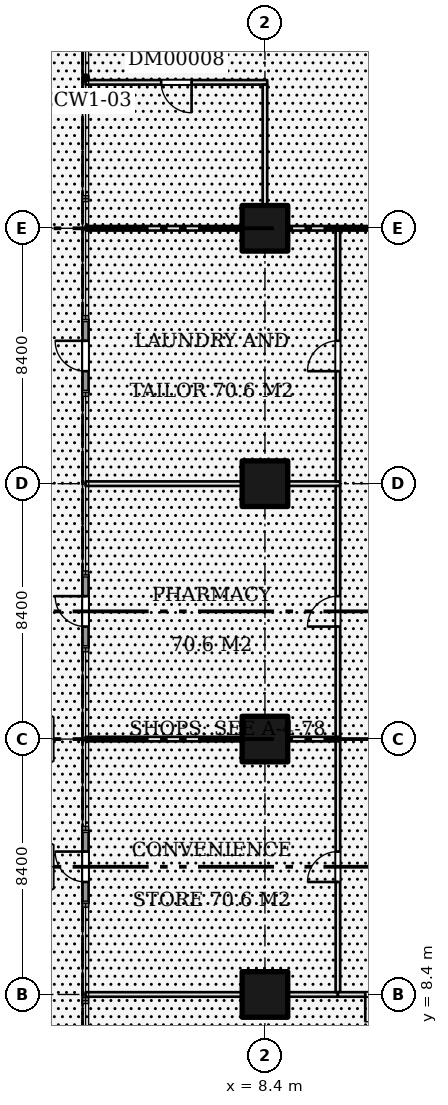
"""IFC4 building model, lengths in metres.
Left out: names, types, materials, properties, quantities, classifications, styles, units other than length and angle.
Written with IfcOpenShell. Run it as: python <this file> out.ifc"""

import sys

from ifc_helpers import new_model, si_unit, direction, frame, frame_2d, origin, origin_2d, place, context, subcontext, project, spatial, rectangle, extrude, element, fill, save


model = new_model("IFC4")
c1 = context("Model", 3, precision=1e-05, world=origin(), true_north=direction((0.0, 1.0)))
c2 = subcontext(c1, "Body", "Model", "MODEL_VIEW")
j1 = project(units=[si_unit("LENGTHUNIT", "METRE"), si_unit("PLANEANGLEUNIT", "RADIAN")], contexts=[c1])
p1 = place(None, origin())
s1 = spatial("IfcSite", under=j1, at=p1, CompositionType="ELEMENT")
p2 = place(p1, origin())
s2 = spatial("IfcBuilding", under=s1, at=p2, CompositionType="ELEMENT")
p3 = place(p2, origin())
s3 = spatial("IfcBuildingStorey", under=s2, at=p3, CompositionType="ELEMENT", Elevation=0.0)
for number, where, z_axis, x_axis in (
    (1, (8.4, 8.4, 0.0), (0.0, 0.0, 1.0), (1.0, 0.0, 0.0)),
    (2, (8.4, 16.8, 0.0), (0.0, 0.0, 1.0), (1.0, 0.0, 0.0)),
    (3, (8.4, 25.2, 0.0), (0.0, 0.0, 1.0), (1.0, 0.0, 0.0)),
    (4, (8.4, 33.6, 0.0), (0.0, 0.0, 1.0), (1.0, 0.0, 0.0)),
):
    element("IfcColumn", number, at=place(p3, frame(where, z_axis=z_axis, x_axis=x_axis)), inside=s3, PredefinedType="COLUMN", context=c2, shape_type="SweptSolid", body=[
        extrude(rectangle(XDim=1.5, YDim=1.5, at=origin_2d()), origin(), (0.0, 0.0, 1.0), 8.7),
    ])
p4 = place(p3, frame((2.5, 8.4, 0.0), z_axis=(0.0, 0.0, 1.0), x_axis=(1.0, 0.0, 0.0)))
e5 = element("IfcWall", 5, at=p4, inside=s3, PredefinedType="PARTITIONING", context=c2, shape_type="SweptSolid", body=[
    extrude(rectangle(XDim=5.15, YDim=0.15, at=frame_2d((2.575, 0.0))), origin(), (0.0, 0.0, 1.0), 8.7),
])
p5 = place(p3, frame((9.15, 8.4, 0.0), z_axis=(0.0, 0.0, 1.0), x_axis=(1.0, 0.0, 0.0)))
e6 = element("IfcWall", 6, at=p5, inside=s3, PredefinedType="PARTITIONING", context=c2, shape_type="SweptSolid", body=[
    extrude(rectangle(XDim=1.65, YDim=0.15, at=frame_2d((0.825, 0.0))), origin(), (0.0, 0.0, 1.0), 8.7),
])
p6 = place(p3, frame((2.5, 16.8, 0.0), z_axis=(0.0, 0.0, 1.0), x_axis=(1.0, 0.0, 0.0)))
e7 = element("IfcWall", 7, at=p6, inside=s3, PredefinedType="PARTITIONING", context=c2, shape_type="SweptSolid", body=[
    extrude(rectangle(XDim=5.15, YDim=0.15, at=frame_2d((2.575, 0.0))), origin(), (0.0, 0.0, 1.0), 8.7),
])
p7 = place(p3, frame((9.15, 16.8, 0.0), z_axis=(0.0, 0.0, 1.0), x_axis=(1.0, 0.0, 0.0)))
e8 = element("IfcWall", 8, at=p7, inside=s3, PredefinedType="PARTITIONING", context=c2, shape_type="SweptSolid", body=[
    extrude(rectangle(XDim=1.725, YDim=0.15, at=frame_2d((0.863, 0.0))), origin(), (0.0, 0.0, 1.0), 8.7),
])
p8 = place(p3, frame((2.5, 25.2, 0.0), z_axis=(0.0, 0.0, 1.0), x_axis=(1.0, 0.0, 0.0)))
e9 = element("IfcWall", 9, at=p8, inside=s3, PredefinedType="PARTITIONING", context=c2, shape_type="SweptSolid", body=[
    extrude(rectangle(XDim=5.15, YDim=0.15, at=frame_2d((2.575, 0.0))), origin(), (0.0, 0.0, 1.0), 8.7),
])
p9 = place(p3, frame((9.15, 25.2, 0.0), z_axis=(0.0, 0.0, 1.0), x_axis=(1.0, 0.0, 0.0)))
e10 = element("IfcWall", 10, at=p9, inside=s3, PredefinedType="PARTITIONING", context=c2, shape_type="SweptSolid", body=[
    extrude(rectangle(XDim=1.725, YDim=0.15, at=frame_2d((0.863, 0.0))), origin(), (0.0, 0.0, 1.0), 8.7),
])
p10 = place(p3, frame((2.5, 33.6, 0.0), z_axis=(0.0, 0.0, 1.0), x_axis=(1.0, 0.0, 0.0)))
e11 = element("IfcWall", 11, at=p10, inside=s3, PredefinedType="PARTITIONING", context=c2, shape_type="SweptSolid", body=[
    extrude(rectangle(XDim=5.15, YDim=0.15, at=frame_2d((2.575, 0.0))), origin(), (0.0, 0.0, 1.0), 8.7),
])
p11 = place(p3, frame((2.5, 38.4, 0.0), z_axis=(0.0, 0.0, 1.0), x_axis=(1.0, 0.0, 0.0)))
e12 = element("IfcWall", 12, at=p11, inside=s3, PredefinedType="PARTITIONING", context=c2, shape_type="SweptSolid", body=[
    extrude(rectangle(XDim=5.975, YDim=0.15, at=frame_2d((2.988, 0.0))), origin(), (0.0, 0.0, 1.0), 8.7),
])
p12 = place(p11, frame((2.488, 0.0, 0.0)))
e13 = element("IfcOpeningElement", 13, at=p12, cuts=e12, PredefinedType="OPENING", context=c2, shape_type="SweptSolid", body=[
    extrude(rectangle(XDim=1.0, YDim=2.1, at=frame_2d((0.5, 1.05))), frame((0.0, 0.085, 0.0), z_axis=(0.0, -1.0, 0.0), x_axis=(1.0, 0.0, 0.0)), (0.0, 0.0, 1.0), 0.17),
])
p13 = place(p3, frame((8.4, 34.35, 0.0), z_axis=(0.0, 0.0, 1.0), x_axis=(0.0, 1.0, 0.0)))
e14 = element("IfcWall", 14, at=p13, inside=s3, PredefinedType="PARTITIONING", context=c2, shape_type="SweptSolid", body=[
    extrude(rectangle(XDim=3.975, YDim=0.15, at=frame_2d((1.987, 0.0))), origin(), (0.0, 0.0, 1.0), 8.7),
])
p14 = place(p3, frame((9.15, 33.6, 0.0), z_axis=(0.0, 0.0, 1.0), x_axis=(1.0, 0.0, 0.0)))
e15 = element("IfcWall", 15, at=p14, inside=s3, PredefinedType="PARTITIONING", context=c2, shape_type="SweptSolid", body=[
    extrude(rectangle(XDim=1.65, YDim=0.15, at=frame_2d((0.825, 0.0))), origin(), (0.0, 0.0, 1.0), 8.7),
])
p15 = place(p3, frame((10.8, 8.475, 0.0), z_axis=(0.0, 0.0, 1.0), x_axis=(0.0, 1.0, 0.0)))
e16 = element("IfcWall", 16, at=p15, inside=s3, PredefinedType="PARTITIONING", context=c2, shape_type="SweptSolid", body=[
    extrude(rectangle(XDim=8.25, YDim=0.15, at=frame_2d((4.125, 0.0))), origin(), (0.0, 0.0, 1.0), 8.7),
])
p16 = place(p15, frame((3.625, 0.0, 0.0)))
e17 = element("IfcOpeningElement", 17, at=p16, cuts=e16, PredefinedType="OPENING", context=c2, shape_type="SweptSolid", body=[
    extrude(rectangle(XDim=1.0, YDim=2.1, at=frame_2d((0.5, 1.05))), frame((0.0, 0.085, 0.0), z_axis=(0.0, -1.0, 0.0), x_axis=(1.0, 0.0, 0.0)), (0.0, 0.0, 1.0), 0.17),
])
p17 = place(p3, frame((10.8, 8.4, 0.0), z_axis=(0.0, 0.0, 1.0), x_axis=(1.0, 0.0, 0.0)))
e18 = element("IfcWall", 18, at=p17, inside=s3, PredefinedType="PARTITIONING", context=c2, shape_type="SweptSolid", body=[
    extrude(rectangle(XDim=3.6, YDim=0.15, at=frame_2d((1.8, 0.0))), origin(), (0.0, 0.0, 1.0), 8.7),
])
p18 = place(p17, frame((0.9, 0.0, 0.0)))
e19 = element("IfcOpeningElement", 19, at=p18, cuts=e18, PredefinedType="OPENING", context=c2, shape_type="SweptSolid", body=[
    extrude(rectangle(XDim=1.8, YDim=2.1, at=frame_2d((0.9, 1.05))), frame((0.0, 0.085, 0.0), z_axis=(0.0, -1.0, 0.0), x_axis=(1.0, 0.0, 0.0)), (0.0, 0.0, 1.0), 0.17),
])
p19 = place(p3, frame((10.8, 16.875, 0.0), z_axis=(0.0, 0.0, 1.0), x_axis=(0.0, 1.0, 0.0)))
e20 = element("IfcWall", 20, at=p19, inside=s3, PredefinedType="PARTITIONING", context=c2, shape_type="SweptSolid", body=[
    extrude(rectangle(XDim=8.25, YDim=0.15, at=frame_2d((4.125, 0.0))), origin(), (0.0, 0.0, 1.0), 8.7),
])
p20 = place(p19, frame((3.625, 0.0, 0.0)))
e21 = element("IfcOpeningElement", 21, at=p20, cuts=e20, PredefinedType="OPENING", context=c2, shape_type="SweptSolid", body=[
    extrude(rectangle(XDim=1.0, YDim=2.1, at=frame_2d((0.5, 1.05))), frame((0.0, 0.085, 0.0), z_axis=(0.0, -1.0, 0.0), x_axis=(1.0, 0.0, 0.0)), (0.0, 0.0, 1.0), 0.17),
])
p21 = place(p3, frame((10.8, 25.275, 0.0), z_axis=(0.0, 0.0, 1.0), x_axis=(0.0, 1.0, 0.0)))
e22 = element("IfcWall", 22, at=p21, inside=s3, PredefinedType="PARTITIONING", context=c2, shape_type="SweptSolid", body=[
    extrude(rectangle(XDim=8.25, YDim=0.15, at=frame_2d((4.125, 0.0))), origin(), (0.0, 0.0, 1.0), 8.7),
])
p22 = place(p21, frame((3.625, 0.0, 0.0)))
e23 = element("IfcOpeningElement", 23, at=p22, cuts=e22, PredefinedType="OPENING", context=c2, shape_type="SweptSolid", body=[
    extrude(rectangle(XDim=1.0, YDim=2.1, at=frame_2d((0.5, 1.05))), frame((0.0, 0.085, 0.0), z_axis=(0.0, -1.0, 0.0), x_axis=(1.0, 0.0, 0.0)), (0.0, 0.0, 1.0), 0.17),
])
p23 = place(p3, frame((10.8, 33.6, 0.0), z_axis=(0.0, 0.0, 1.0), x_axis=(1.0, 0.0, 0.0)))
e24 = element("IfcWall", 24, at=p23, inside=s3, PredefinedType="PARTITIONING", context=c2, shape_type="SweptSolid", body=[
    extrude(rectangle(XDim=3.6, YDim=0.15, at=frame_2d((1.8, 0.0))), origin(), (0.0, 0.0, 1.0), 8.7),
])
p24 = place(p3, frame((2.5, 30.6, 0.0), z_axis=(0.0, 0.0, 1.0), x_axis=(0.0, -1.0, 0.0)))
e25 = element("IfcWall", 25, at=p24, inside=s3, PredefinedType="SOLIDWALL", context=c2, shape_type="SweptSolid", body=[
    extrude(rectangle(XDim=2.4, YDim=0.2, at=frame_2d((1.2, 0.0))), origin(), (0.0, 0.0, 1.0), 8.7),
])
p25 = place(p24, frame((0.7, 0.0, 0.0)))
e26 = element("IfcOpeningElement", 26, at=p25, cuts=e25, PredefinedType="OPENING", context=c2, shape_type="SweptSolid", body=[
    extrude(rectangle(XDim=1.0, YDim=2.4, at=frame_2d((0.5, 1.2))), frame((0.0, 0.11, 0.0), z_axis=(0.0, -1.0, 0.0), x_axis=(1.0, 0.0, 0.0)), (0.0, 0.0, 1.0), 0.22),
])
p26 = place(p3, frame((2.5, 22.2, 0.0), z_axis=(0.0, 0.0, 1.0), x_axis=(0.0, -1.0, 0.0)))
e27 = element("IfcWall", 27, at=p26, inside=s3, PredefinedType="SOLIDWALL", context=c2, shape_type="SweptSolid", body=[
    extrude(rectangle(XDim=2.4, YDim=0.2, at=frame_2d((1.2, 0.0))), origin(), (0.0, 0.0, 1.0), 8.7),
])
p27 = place(p26, frame((0.7, 0.0, 0.0)))
e28 = element("IfcOpeningElement", 28, at=p27, cuts=e27, PredefinedType="OPENING", context=c2, shape_type="SweptSolid", body=[
    extrude(rectangle(XDim=1.0, YDim=2.4, at=frame_2d((0.5, 1.2))), frame((0.0, 0.11, 0.0), z_axis=(0.0, -1.0, 0.0), x_axis=(1.0, 0.0, 0.0)), (0.0, 0.0, 1.0), 0.22),
])
p28 = place(p3, frame((2.5, 13.8, 0.0), z_axis=(0.0, 0.0, 1.0), x_axis=(0.0, -1.0, 0.0)))
e29 = element("IfcWall", 29, at=p28, inside=s3, PredefinedType="SOLIDWALL", context=c2, shape_type="SweptSolid", body=[
    extrude(rectangle(XDim=2.4, YDim=0.2, at=frame_2d((1.2, 0.0))), origin(), (0.0, 0.0, 1.0), 8.7),
])
p29 = place(p28, frame((0.7, 0.0, 0.0)))
e30 = element("IfcOpeningElement", 30, at=p29, cuts=e29, PredefinedType="OPENING", context=c2, shape_type="SweptSolid", body=[
    extrude(rectangle(XDim=1.0, YDim=2.4, at=frame_2d((0.5, 1.2))), frame((0.0, 0.11, 0.0), z_axis=(0.0, -1.0, 0.0), x_axis=(1.0, 0.0, 0.0)), (0.0, 0.0, 1.0), 0.22),
])
p30 = place(p16, origin())
e31 = element("IfcDoor", 31, at=p30, inside=s3, OperationType="SINGLE_SWING_LEFT", PredefinedType="DOOR", context=c2, shape_type="SweptSolid", body=[
    extrude(rectangle(XDim=1.0, YDim=2.1, at=frame_2d((0.5, 1.05))), frame((0.0, 0.025, 0.0), z_axis=(0.0, -1.0, 0.0), x_axis=(1.0, 0.0, 0.0)), (0.0, 0.0, 1.0), 0.05),
])
fill(e17, e31)
p31 = place(p20, origin())
e32 = element("IfcDoor", 32, at=p31, inside=s3, OperationType="SINGLE_SWING_LEFT", PredefinedType="DOOR", context=c2, shape_type="SweptSolid", body=[
    extrude(rectangle(XDim=1.0, YDim=2.1, at=frame_2d((0.5, 1.05))), frame((0.0, 0.025, 0.0), z_axis=(0.0, -1.0, 0.0), x_axis=(1.0, 0.0, 0.0)), (0.0, 0.0, 1.0), 0.05),
])
fill(e21, e32)
p32 = place(p22, origin())
e33 = element("IfcDoor", 33, at=p32, inside=s3, OperationType="SINGLE_SWING_LEFT", PredefinedType="DOOR", context=c2, shape_type="SweptSolid", body=[
    extrude(rectangle(XDim=1.0, YDim=2.1, at=frame_2d((0.5, 1.05))), frame((0.0, 0.025, 0.0), z_axis=(0.0, -1.0, 0.0), x_axis=(1.0, 0.0, 0.0)), (0.0, 0.0, 1.0), 0.05),
])
fill(e23, e33)
p33 = place(p18, frame((1.8, 0.0, 0.0), z_axis=(0.0, 0.0, 1.0), x_axis=(-1.0, 0.0, 0.0)))
e34 = element("IfcDoor", 34, at=p33, inside=s3, OperationType="DOUBLE_DOOR_SINGLE_SWING", PredefinedType="DOOR", context=c2, shape_type="SweptSolid", body=[
    extrude(rectangle(XDim=1.8, YDim=2.1, at=frame_2d((0.9, 1.05))), frame((0.0, 0.025, 0.0), z_axis=(0.0, -1.0, 0.0), x_axis=(1.0, 0.0, 0.0)), (0.0, 0.0, 1.0), 0.05),
])
fill(e19, e34)
p34 = place(p12, frame((1.0, 0.0, 0.0), z_axis=(0.0, 0.0, 1.0), x_axis=(-1.0, 0.0, 0.0)))
e35 = element("IfcDoor", 35, at=p34, inside=s3, OperationType="SINGLE_SWING_LEFT", PredefinedType="DOOR", context=c2, shape_type="SweptSolid", body=[
    extrude(rectangle(XDim=1.0, YDim=2.1, at=frame_2d((0.5, 1.05))), frame((0.0, 0.025, 0.0), z_axis=(0.0, -1.0, 0.0), x_axis=(1.0, 0.0, 0.0)), (0.0, 0.0, 1.0), 0.05),
])
fill(e13, e35)
p35 = place(p25, frame((1.0, 0.0, 0.0), z_axis=(0.0, 0.0, 1.0), x_axis=(-1.0, 0.0, 0.0)))
e36 = element("IfcDoor", 36, at=p35, inside=s3, OperationType="SINGLE_SWING_RIGHT", PredefinedType="DOOR", context=c2, shape_type="SweptSolid", body=[
    extrude(rectangle(XDim=1.0, YDim=2.4, at=frame_2d((0.5, 1.2))), frame((0.0, 0.025, 0.0), z_axis=(0.0, -1.0, 0.0), x_axis=(1.0, 0.0, 0.0)), (0.0, 0.0, 1.0), 0.05),
])
fill(e26, e36)
p36 = place(p27, frame((1.0, 0.0, 0.0), z_axis=(0.0, 0.0, 1.0), x_axis=(-1.0, 0.0, 0.0)))
e37 = element("IfcDoor", 37, at=p36, inside=s3, OperationType="SINGLE_SWING_RIGHT", PredefinedType="DOOR", context=c2, shape_type="SweptSolid", body=[
    extrude(rectangle(XDim=1.0, YDim=2.4, at=frame_2d((0.5, 1.2))), frame((0.0, 0.025, 0.0), z_axis=(0.0, -1.0, 0.0), x_axis=(1.0, 0.0, 0.0)), (0.0, 0.0, 1.0), 0.05),
])
fill(e28, e37)
p37 = place(p29, frame((1.0, 0.0, 0.0), z_axis=(0.0, 0.0, 1.0), x_axis=(-1.0, 0.0, 0.0)))
e38 = element("IfcDoor", 38, at=p37, inside=s3, OperationType="SINGLE_SWING_RIGHT", PredefinedType="DOOR", context=c2, shape_type="SweptSolid", body=[
    extrude(rectangle(XDim=1.0, YDim=2.4, at=frame_2d((0.5, 1.2))), frame((0.0, 0.025, 0.0), z_axis=(0.0, -1.0, 0.0), x_axis=(1.0, 0.0, 0.0)), (0.0, 0.0, 1.0), 0.05),
])
fill(e30, e38)
save(model, sys.argv[1])
